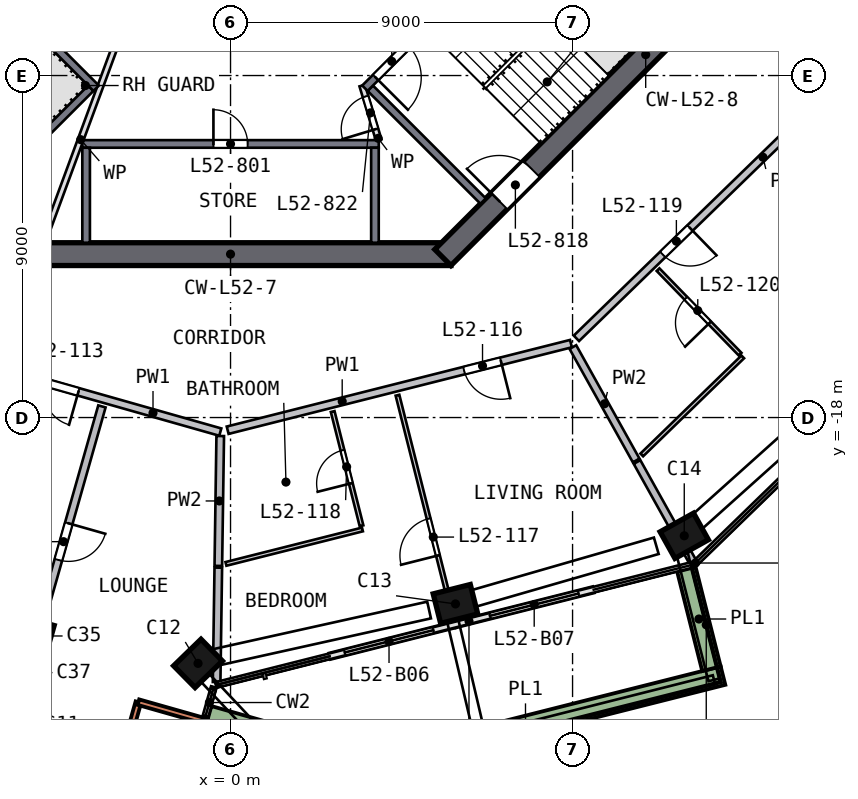
"""IFC4 building model, lengths in metres.
Left out: names, types, materials, properties, quantities, classifications, styles, units other than length and angle.
Written with IfcOpenShell. Run it as: python <this file> out.ifc"""

import sys

from ifc_helpers import new_model, si_unit, direction, frame, frame_2d, origin, origin_2d, place, context, subcontext, project, spatial, rectangle, extrude, element, fill, save


model = new_model("IFC4")
c1 = context("Model", 3, precision=1e-05, world=origin(), true_north=direction((0.0, 1.0)))
c2 = subcontext(c1, "Body", "Model", "MODEL_VIEW")
j1 = project(units=[si_unit("LENGTHUNIT", "METRE"), si_unit("PLANEANGLEUNIT", "RADIAN")], contexts=[c1])
p1 = place(None, origin())
s1 = spatial("IfcSite", under=j1, at=p1, CompositionType="ELEMENT")
p2 = place(p1, origin())
s2 = spatial("IfcBuilding", under=s1, at=p2, CompositionType="ELEMENT")
p3 = place(p2, frame((0.0, 0.0, 212.5)))
s3 = spatial("IfcBuildingStorey", under=s2, at=p3, CompositionType="ELEMENT", Elevation=212.5)
p4 = place(p3, frame((-0.996, -24.465, 0.0), z_axis=(0.116310459, -0.003798882, 0.993205641), x_axis=(-0.71056635, -0.699005782, 0.080538062)))
e1 = element("IfcColumn", 1, at=p4, inside=s3, PredefinedType="COLUMN", context=c2, shape_type="SweptSolid", body=[
    extrude(rectangle(XDim=1.0, YDim=0.8, at=origin_2d()), origin(), (0.0, 0.0, 1.0), 3.021),
])
p5 = place(p3, frame((5.788, -22.939, 0.0), z_axis=(0.108842351, 0.028463973, 0.99365142), x_axis=(0.96342149, 0.243234613, -0.112498691)))
e2 = element("IfcColumn", 2, at=p5, inside=s3, PredefinedType="COLUMN", context=c2, shape_type="SweptSolid", body=[
    extrude(rectangle(XDim=1.0, YDim=0.8, at=origin_2d()), origin(), (0.0, 0.0, 1.0), 3.019),
])
p6 = place(p3, frame((11.818, -21.181, 0.0), z_axis=(0.100237911, 0.057070939, 0.993325359), x_axis=(-0.867359933, -0.484131141, 0.115342033)))
e3 = element("IfcColumn", 3, at=p6, inside=s3, PredefinedType="COLUMN", context=c2, shape_type="SweptSolid", body=[
    extrude(rectangle(XDim=1.0, YDim=0.8, at=origin_2d()), origin(), (0.0, 0.0, 1.0), 3.02),
])
p7 = place(p3, frame((-5.274, -23.719, 0.0), z_axis=(0.112927488, -0.024169878, 0.993309216), x_axis=(-0.272497155, -0.96212682, 0.007568572)))
e4 = element("IfcColumn", 4, at=p7, inside=s3, PredefinedType="COLUMN", context=c2, shape_type="SweptSolid", body=[
    extrude(rectangle(XDim=0.8, YDim=0.8, at=origin_2d()), origin(), (0.0, 0.0, 1.0), 3.02),
])
p8 = place(p3, frame((-5.799, -13.7, 0.0), z_axis=(0.0, 0.0, 1.0), x_axis=(1.0, 0.0, 0.0)))
e5 = element("IfcWall", 5, at=p8, inside=s3, PredefinedType="SHEAR", context=c2, shape_type="SweptSolid", body=[
    extrude(rectangle(XDim=11.598, YDim=0.6, at=frame_2d((5.799, 0.0))), origin(), (0.0, 0.0, 1.0), 3.5),
])
p9 = place(p3, frame((5.587, -13.788, 0.0), z_axis=(0.0, 0.0, 1.0), x_axis=(0.707106781, 0.707106781, 0.0)))
e6 = element("IfcWall", 6, at=p9, inside=s3, PredefinedType="SHEAR", context=c2, shape_type="SweptSolid", body=[
    extrude(rectangle(XDim=11.598, YDim=0.6, at=frame_2d((5.799, 0.0))), origin(), (0.0, 0.0, 1.0), 3.5),
])
p10 = place(p9, frame((2.099, 0.0, 0.0)))
e7 = element("IfcOpeningElement", 7, at=p10, cuts=e6, PredefinedType="OPENING", context=c2, shape_type="SweptSolid", body=[
    extrude(rectangle(XDim=1.2, YDim=2.1, at=frame_2d((0.6, 1.05))), frame((0.0, 0.31, 0.0), z_axis=(0.0, -1.0, 0.0), x_axis=(1.0, 0.0, 0.0)), (0.0, 0.0, 1.0), 0.62),
])
p11 = place(p3, frame((-2.936, -27.293, 0.0), z_axis=(0.0, 0.0, 1.0), x_axis=(0.27293203, 0.962033319, 0.0)))
e8 = element("IfcWall", 8, at=p11, inside=s3, PredefinedType="SOLIDWALL", context=c2, shape_type="SweptSolid", body=[
    extrude(rectangle(XDim=1.875, YDim=0.15, at=frame_2d((0.938, 0.0))), origin(), (0.0, 0.0, 1.0), 3.0),
])
p12 = place(p3, frame((-2.425, -25.49, 0.0), z_axis=(0.0, 0.0, 1.0), x_axis=(0.962043017, -0.272897843, 0.0)))
e9 = element("IfcWall", 9, at=p12, inside=s3, PredefinedType="SOLIDWALL", context=c2, shape_type="SweptSolid", body=[
    extrude(rectangle(XDim=1.875, YDim=0.15, at=frame_2d((0.938, 0.0))), origin(), (0.0, 0.0, 1.0), 3.0),
])
p13 = place(p3, frame((2.619, -24.28, 0.0), z_axis=(0.0, 0.0, 1.0), x_axis=(0.969612207, 0.244647026, 0.0)))
e10 = element("IfcWall", 10, at=p13, inside=s3, PredefinedType="SOLIDWALL", context=c2, shape_type="SweptSolid", body=[
    extrude(rectangle(XDim=3.4, YDim=0.15, at=frame_2d((1.7, 0.0))), origin(), (0.0, 0.0, 1.0), 2.935),
])
p14 = place(p13, frame((0.4, 0.0, 0.0)))
e11 = element("IfcOpeningElement", 11, at=p14, cuts=e10, PredefinedType="OPENING", context=c2, shape_type="SweptSolid", body=[
    extrude(rectangle(XDim=2.4, YDim=2.4, at=frame_2d((1.2, 1.2))), frame((0.0, 0.085, 0.0), z_axis=(0.0, -1.0, 0.0), x_axis=(1.0, 0.0, 0.0)), (0.0, 0.0, 1.0), 0.17),
])
p15 = place(p3, frame((5.916, -23.448, 0.0), z_axis=(0.0, 0.0, 1.0), x_axis=(0.969617968, 0.244624194, 0.0)))
e12 = element("IfcWall", 12, at=p15, inside=s3, PredefinedType="SOLIDWALL", context=c2, shape_type="SweptSolid", body=[
    extrude(rectangle(XDim=3.74, YDim=0.15, at=frame_2d((1.87, 0.0))), origin(), (0.0, 0.0, 1.0), 2.935),
])
p16 = place(p15, frame((0.94, 0.0, 0.0)))
e13 = element("IfcOpeningElement", 13, at=p16, cuts=e12, PredefinedType="OPENING", context=c2, shape_type="SweptSolid", body=[
    extrude(rectangle(XDim=2.4, YDim=2.4, at=frame_2d((1.2, 1.2))), frame((0.0, 0.085, 0.0), z_axis=(0.0, -1.0, 0.0), x_axis=(1.0, 0.0, 0.0)), (0.0, 0.0, 1.0), 0.17),
])
p17 = place(p3, frame((-0.572, -25.833, 0.0), z_axis=(0.0, 0.0, 1.0), x_axis=(0.962049015, -0.272876699, 0.0)))
e14 = element("IfcWall", 14, at=p17, inside=s3, PredefinedType="SOLIDWALL", context=c2, shape_type="SweptSolid", body=[
    extrude(rectangle(XDim=1.731, YDim=0.5, at=frame_2d((0.866, 0.0))), origin(), (0.0, 0.0, 1.0), 0.7),
])
p18 = place(p3, frame((2.565, -27.414, 0.0), z_axis=(0.0, 0.0, 1.0), x_axis=(0.969616404, 0.244630395, 0.0)))
e15 = element("IfcWall", 15, at=p18, inside=s3, PredefinedType="SOLIDWALL", context=c2, shape_type="SweptSolid", body=[
    extrude(rectangle(XDim=10.719, YDim=0.5, at=frame_2d((5.36, 0.0))), origin(), (0.0, 0.0, 1.0), 0.7),
])
p19 = place(p3, frame((12.655, -24.61, 0.0), z_axis=(0.0, 0.0, 1.0), x_axis=(-0.244684701, 0.969602701, 0.0)))
e16 = element("IfcWall", 16, at=p19, inside=s3, PredefinedType="SOLIDWALL", context=c2, shape_type="SweptSolid", body=[
    extrude(rectangle(XDim=2.699, YDim=0.5, at=frame_2d((1.35, 0.0))), origin(), (0.0, 0.0, 1.0), 0.7),
])
p20 = place(p3, frame((-3.9, -10.8, 0.0), z_axis=(0.0, 0.0, 1.0), x_axis=(1.0, 0.0, 0.0)))
e17 = element("IfcWall", 17, at=p20, inside=s3, PredefinedType="SOLIDWALL", context=c2, shape_type="SweptSolid", body=[
    extrude(rectangle(XDim=7.8, YDim=0.2, at=frame_2d((3.9, 0.0))), origin(), (0.0, 0.0, 1.0), 3.0),
])
p21 = place(p20, frame((3.45, 0.0, 0.0)))
e18 = element("IfcOpeningElement", 18, at=p21, cuts=e17, PredefinedType="OPENING", context=c2, shape_type="SweptSolid", body=[
    extrude(rectangle(XDim=0.9, YDim=2.1, at=frame_2d((0.45, 1.05))), frame((0.0, 0.11, 0.0), z_axis=(0.0, -1.0, 0.0), x_axis=(1.0, 0.0, 0.0)), (0.0, 0.0, 1.0), 0.22),
])
for number, where, z_axis, x_axis in (
    (19, (-3.8, -10.9, 0.0), (0.0, 0.0, 1.0), (0.0, -1.0, 0.0)),
    (20, (3.8, -10.9, 0.0), (0.0, 0.0, 1.0), (0.0, -1.0, 0.0)),
):
    element("IfcWall", number, at=place(p3, frame(where, z_axis=z_axis, x_axis=x_axis)), inside=s3, PredefinedType="SOLIDWALL", context=c2, shape_type="SweptSolid", body=[
        extrude(rectangle(XDim=2.5, YDim=0.2, at=frame_2d((1.25, 0.0))), origin(), (0.0, 0.0, 1.0), 3.0),
    ])
p22 = place(p3, frame((-3.535, -9.334, 0.0), z_axis=(0.0, 0.0, 1.0), x_axis=(-0.707120946, 0.707092617, 0.0)))
e21 = element("IfcWall", 21, at=p22, inside=s3, PredefinedType="SOLIDWALL", context=c2, shape_type="SweptSolid", body=[
    extrude(rectangle(XDim=8.618, YDim=0.2, at=frame_2d((4.309, 0.0))), origin(), (0.0, 0.0, 1.0), 3.0),
])
p23 = place(p22, frame((6.6, 0.0, 0.0)))
e22 = element("IfcOpeningElement", 22, at=p23, cuts=e21, PredefinedType="OPENING", context=c2, shape_type="SweptSolid", body=[
    extrude(rectangle(XDim=1.2, YDim=2.1, at=frame_2d((0.6, 1.05))), frame((0.0, 0.11, 0.0), z_axis=(0.0, -1.0, 0.0), x_axis=(1.0, 0.0, 0.0)), (0.0, 0.0, 1.0), 0.22),
])
p24 = place(p3, frame((-3.677, -9.334, 0.0), z_axis=(0.0, 0.0, 1.0), x_axis=(-0.707077716, -0.707135845, 0.0)))
e23 = element("IfcWall", 23, at=p24, inside=s3, PredefinedType="SOLIDWALL", context=c2, shape_type="SweptSolid", body=[
    extrude(rectangle(XDim=4.2, YDim=0.2, at=frame_2d((2.1, 0.0))), origin(), (0.0, 0.0, 1.0), 3.0),
])
p25 = place(p3, frame((9.629, -3.24, 0.0), z_axis=(0.0, 0.0, 1.0), x_axis=(-0.707120946, -0.707092617, 0.0)))
e24 = element("IfcWall", 24, at=p25, inside=s3, PredefinedType="SOLIDWALL", context=c2, shape_type="SweptSolid", body=[
    extrude(rectangle(XDim=8.618, YDim=0.2, at=frame_2d((4.309, 0.0))), origin(), (0.0, 0.0, 1.0), 3.0),
])
p26 = place(p25, frame((7.018, 0.0, 0.0)))
e25 = element("IfcOpeningElement", 25, at=p26, cuts=e24, PredefinedType="OPENING", context=c2, shape_type="SweptSolid", body=[
    extrude(rectangle(XDim=1.2, YDim=2.1, at=frame_2d((0.6, 1.05))), frame((0.0, 0.11, 0.0), z_axis=(0.0, -1.0, 0.0), x_axis=(1.0, 0.0, 0.0)), (0.0, 0.0, 1.0), 0.22),
])
p27 = place(p3, frame((3.677, -9.334, 0.0), z_axis=(0.0, 0.0, 1.0), x_axis=(0.707077716, -0.707135845, 0.0)))
e26 = element("IfcWall", 26, at=p27, inside=s3, PredefinedType="SOLIDWALL", context=c2, shape_type="SweptSolid", body=[
    extrude(rectangle(XDim=4.2, YDim=0.2, at=frame_2d((2.1, 0.0))), origin(), (0.0, 0.0, 1.0), 3.0),
])
p28 = place(p3, frame((3.9, -10.7, 0.0), z_axis=(0.0, 0.0, 1.0), x_axis=(-0.289808785, 0.957084567, 0.0)))
e27 = element("IfcWall", 27, at=p28, inside=s3, PredefinedType="PARTITIONING", context=c2, shape_type="SweptSolid", body=[
    extrude(rectangle(XDim=1.501, YDim=0.15, at=frame_2d((0.75, 0.0))), origin(), (0.0, 0.0, 1.0), 3.0),
])
p29 = place(p28, frame((0.301, 0.0, 0.0)))
e28 = element("IfcOpeningElement", 28, at=p29, cuts=e27, PredefinedType="OPENING", context=c2, shape_type="SweptSolid", body=[
    extrude(rectangle(XDim=0.9, YDim=2.1, at=frame_2d((0.45, 1.05))), frame((0.0, 0.085, 0.0), z_axis=(0.0, -1.0, 0.0), x_axis=(1.0, 0.0, 0.0)), (0.0, 0.0, 1.0), 0.17),
])
p30 = place(p3, frame((-1.776, -4.813, 0.0), z_axis=(0.0, 0.0, 1.0), x_axis=(-0.346112108, -0.938193162, 0.0)))
e29 = element("IfcWall", 29, at=p30, inside=s3, PredefinedType="PARTITIONING", context=c2, shape_type="SweptSolid", body=[
    extrude(rectangle(XDim=9.123, YDim=0.15, at=frame_2d((4.562, 0.0))), origin(), (0.0, 0.0, 1.0), 3.0),
])
p31 = place(p30, frame((1.4, 0.0, 0.0)))
e30 = element("IfcOpeningElement", 30, at=p31, cuts=e29, PredefinedType="OPENING", context=c2, shape_type="SweptSolid", body=[
    extrude(rectangle(XDim=1.8, YDim=2.1, at=frame_2d((0.9, 1.05))), frame((0.0, 0.085, 0.0), z_axis=(0.0, -1.0, 0.0), x_axis=(1.0, 0.0, 0.0)), (0.0, 0.0, 1.0), 0.17),
])
p32 = place(p3, frame((-0.27, -18.383, 0.0), z_axis=(0.0, 0.0, 1.0), x_axis=(-0.96202861, 0.272948627, 0.0)))
e31 = element("IfcWall", 31, at=p32, inside=s3, PredefinedType="SOLIDWALL", context=c2, shape_type="SweptSolid", body=[
    extrude(rectangle(XDim=9.317, YDim=0.2, at=frame_2d((4.658, 0.0))), origin(), (0.0, 0.0, 1.0), 3.0),
])
p33 = place(p32, frame((3.881, 0.0, 0.0)))
e32 = element("IfcOpeningElement", 32, at=p33, cuts=e31, PredefinedType="OPENING", context=c2, shape_type="SweptSolid", body=[
    extrude(rectangle(XDim=1.8, YDim=2.1, at=frame_2d((0.9, 1.05))), frame((0.0, 0.11, 0.0), z_axis=(0.0, -1.0, 0.0), x_axis=(1.0, 0.0, 0.0)), (0.0, 0.0, 1.0), 0.22),
])
p34 = place(p3, frame((8.958, -16.055, 0.0), z_axis=(0.0, 0.0, 1.0), x_axis=(-0.969613039, -0.244643731, 0.0)))
e33 = element("IfcWall", 33, at=p34, inside=s3, PredefinedType="SOLIDWALL", context=c2, shape_type="SweptSolid", body=[
    extrude(rectangle(XDim=9.317, YDim=0.2, at=frame_2d((4.658, 0.0))), origin(), (0.0, 0.0, 1.0), 3.0),
])
p35 = place(p34, frame((1.9, 0.0, 0.0)))
e34 = element("IfcOpeningElement", 34, at=p35, cuts=e33, PredefinedType="OPENING", context=c2, shape_type="SweptSolid", body=[
    extrude(rectangle(XDim=1.0, YDim=2.1, at=frame_2d((0.5, 1.05))), frame((0.0, 0.11, 0.0), z_axis=(0.0, -1.0, 0.0), x_axis=(1.0, 0.0, 0.0)), (0.0, 0.0, 1.0), 0.22),
])
p36 = place(p3, frame((15.785, -9.425, 0.0), z_axis=(0.0, 0.0, 1.0), x_axis=(-0.717395, -0.696666645, 0.0)))
e35 = element("IfcWall", 35, at=p36, inside=s3, PredefinedType="SOLIDWALL", context=c2, shape_type="SweptSolid", body=[
    extrude(rectangle(XDim=9.316, YDim=0.2, at=frame_2d((4.658, 0.0))), origin(), (0.0, 0.0, 1.0), 3.0),
])
p37 = place(p36, frame((5.15, 0.0, 0.0)))
e36 = element("IfcOpeningElement", 36, at=p37, cuts=e35, PredefinedType="OPENING", context=c2, shape_type="SweptSolid", body=[
    extrude(rectangle(XDim=1.0, YDim=2.1, at=frame_2d((0.5, 1.05))), frame((0.0, 0.11, 0.0), z_axis=(0.0, -1.0, 0.0), x_axis=(1.0, 0.0, 0.0)), (0.0, 0.0, 1.0), 0.22),
])
p38 = place(p3, frame((-3.384, -17.707, 0.0), z_axis=(0.0, 0.0, 1.0), x_axis=(-0.272938926, -0.962031363, 0.0)))
e37 = element("IfcWall", 37, at=p38, inside=s3, PredefinedType="SOLIDWALL", context=c2, shape_type="SweptSolid", body=[
    extrude(rectangle(XDim=10.75, YDim=0.2, at=frame_2d((5.375, 0.0))), origin(), (0.0, 0.0, 1.0), 3.0),
])
p39 = place(p38, frame((3.2, 0.0, 0.0)))
e38 = element("IfcOpeningElement", 38, at=p39, cuts=e37, PredefinedType="OPENING", context=c2, shape_type="SweptSolid", body=[
    extrude(rectangle(XDim=1.0, YDim=2.1, at=frame_2d((0.5, 1.05))), frame((0.0, 0.11, 0.0), z_axis=(0.0, -1.0, 0.0), x_axis=(1.0, 0.0, 0.0)), (0.0, 0.0, 1.0), 0.22),
])
p40 = place(p3, frame((-0.322, -21.95, 0.0), z_axis=(0.0, 0.0, 1.0), x_axis=(-0.014673303, -0.999892341, 0.0)))
e39 = element("IfcWall", 39, at=p40, inside=s3, PredefinedType="SOLIDWALL", context=c2, shape_type="SweptSolid", body=[
    extrude(rectangle(XDim=3.011, YDim=0.2, at=frame_2d((1.506, 0.0))), origin(), (0.0, 0.0, 1.0), 3.0),
])
p41 = place(p3, frame((-0.271, -18.486, 0.0), z_axis=(0.0, 0.0, 1.0), x_axis=(-0.014712693, -0.999891762, 0.0)))
e40 = element("IfcWall", 40, at=p41, inside=s3, PredefinedType="SOLIDWALL", context=c2, shape_type="SweptSolid", body=[
    extrude(rectangle(XDim=3.418, YDim=0.2, at=frame_2d((1.709, 0.0))), origin(), (0.0, 0.0, 1.0), 3.0),
])
p42 = place(p3, frame((9.008, -16.145, 0.0), z_axis=(0.0, 0.0, 1.0), x_axis=(0.487261051, -0.873256359, 0.0)))
e41 = element("IfcWall", 41, at=p42, inside=s3, PredefinedType="SOLIDWALL", context=c2, shape_type="SweptSolid", body=[
    extrude(rectangle(XDim=3.419, YDim=0.2, at=frame_2d((1.709, 0.0))), origin(), (0.0, 0.0, 1.0), 3.0),
])
p43 = place(p3, frame((10.696, -19.17, 0.0), z_axis=(0.0, 0.0, 1.0), x_axis=(0.487287097, -0.873241825, 0.0)))
e42 = element("IfcWall", 42, at=p43, inside=s3, PredefinedType="SOLIDWALL", context=c2, shape_type="SweptSolid", body=[
    extrude(rectangle(XDim=3.012, YDim=0.2, at=frame_2d((1.506, 0.0))), origin(), (0.0, 0.0, 1.0), 3.0),
])
p44 = place(p3, frame((-0.12, -21.852, 0.0), z_axis=(0.0, 0.0, 1.0), x_axis=(0.969609013, 0.244659687, 0.0)))
e43 = element("IfcWall", 43, at=p44, inside=s3, PredefinedType="PARTITIONING", context=c2, shape_type="SweptSolid", body=[
    extrude(rectangle(XDim=3.704, YDim=0.1, at=frame_2d((1.852, 0.0))), origin(), (0.0, 0.0, 1.0), 3.0),
])
p45 = place(p3, frame((3.447, -20.849, 0.0), z_axis=(0.0, 0.0, 1.0), x_axis=(-0.244610474, 0.969621429, 0.0)))
e44 = element("IfcWall", 44, at=p45, inside=s3, PredefinedType="PARTITIONING", context=c2, shape_type="SweptSolid", body=[
    extrude(rectangle(XDim=3.1, YDim=0.1, at=frame_2d((1.55, 0.0))), origin(), (0.0, 0.0, 1.0), 3.0),
])
p46 = place(p45, frame((1.15, 0.0, 0.0)))
e45 = element("IfcOpeningElement", 45, at=p46, cuts=e44, PredefinedType="OPENING", context=c2, shape_type="SweptSolid", body=[
    extrude(rectangle(XDim=0.9, YDim=2.1, at=frame_2d((0.45, 1.05))), frame((0.0, 0.06, 0.0), z_axis=(0.0, -1.0, 0.0), x_axis=(1.0, 0.0, 0.0)), (0.0, 0.0, 1.0), 0.12),
])
p47 = place(p3, frame((5.898, -23.376, 0.0), z_axis=(0.0, 0.0, 1.0), x_axis=(-0.244618035, 0.969619522, 0.0)))
e46 = element("IfcWall", 46, at=p47, inside=s3, PredefinedType="PARTITIONING", context=c2, shape_type="SweptSolid", body=[
    extrude(rectangle(XDim=6.15, YDim=0.1, at=frame_2d((3.075, 0.0))), origin(), (0.0, 0.0, 1.0), 3.0),
])
p48 = place(p47, frame((1.8, 0.0, 0.0)))
e47 = element("IfcOpeningElement", 47, at=p48, cuts=e46, PredefinedType="OPENING", context=c2, shape_type="SweptSolid", body=[
    extrude(rectangle(XDim=1.0, YDim=2.1, at=frame_2d((0.5, 1.05))), frame((0.0, 0.06, 0.0), z_axis=(0.0, -1.0, 0.0), x_axis=(1.0, 0.0, 0.0)), (0.0, 0.0, 1.0), 0.12),
])
p49 = place(p3, frame((13.479, -16.404, 0.0), z_axis=(0.0, 0.0, 1.0), x_axis=(-0.71737914, -0.696682976, 0.0)))
e48 = element("IfcWall", 48, at=p49, inside=s3, PredefinedType="PARTITIONING", context=c2, shape_type="SweptSolid", body=[
    extrude(rectangle(XDim=3.704, YDim=0.1, at=frame_2d((1.852, 0.0))), origin(), (0.0, 0.0, 1.0), 3.0),
])
p50 = place(p3, frame((13.409, -16.332, 0.0), z_axis=(0.0, 0.0, 1.0), x_axis=(-0.696635178, 0.717425556, 0.0)))
e49 = element("IfcWall", 49, at=p50, inside=s3, PredefinedType="PARTITIONING", context=c2, shape_type="SweptSolid", body=[
    extrude(rectangle(XDim=3.1, YDim=0.1, at=frame_2d((1.55, 0.0))), origin(), (0.0, 0.0, 1.0), 3.0),
])
p51 = place(p50, frame((1.15, 0.0, 0.0)))
e50 = element("IfcOpeningElement", 50, at=p51, cuts=e49, PredefinedType="OPENING", context=c2, shape_type="SweptSolid", body=[
    extrude(rectangle(XDim=0.9, YDim=2.1, at=frame_2d((0.45, 1.05))), frame((0.0, 0.06, 0.0), z_axis=(0.0, -1.0, 0.0), x_axis=(1.0, 0.0, 0.0)), (0.0, 0.0, 1.0), 0.12),
])
p52 = place(p14, origin())
e51 = element("IfcDoor", 51, at=p52, inside=s3, OperationType="SLIDING_TO_RIGHT", PredefinedType="DOOR", context=c2, shape_type="SweptSolid", body=[
    extrude(rectangle(XDim=2.4, YDim=2.4, at=frame_2d((1.2, 1.2))), frame((0.0, 0.025, 0.0), z_axis=(0.0, -1.0, 0.0), x_axis=(1.0, 0.0, 0.0)), (0.0, 0.0, 1.0), 0.05),
])
fill(e11, e51)
p53 = place(p16, origin())
e52 = element("IfcDoor", 52, at=p53, inside=s3, OperationType="SLIDING_TO_LEFT", PredefinedType="DOOR", context=c2, shape_type="SweptSolid", body=[
    extrude(rectangle(XDim=2.4, YDim=2.4, at=frame_2d((1.2, 1.2))), frame((0.0, 0.025, 0.0), z_axis=(0.0, -1.0, 0.0), x_axis=(1.0, 0.0, 0.0)), (0.0, 0.0, 1.0), 0.05),
])
fill(e13, e52)
p54 = place(p21, origin())
e53 = element("IfcDoor", 53, at=p54, inside=s3, OperationType="SINGLE_SWING_LEFT", PredefinedType="DOOR", context=c2, shape_type="SweptSolid", body=[
    extrude(rectangle(XDim=0.9, YDim=2.1, at=frame_2d((0.45, 1.05))), frame((0.0, 0.025, 0.0), z_axis=(0.0, -1.0, 0.0), x_axis=(1.0, 0.0, 0.0)), (0.0, 0.0, 1.0), 0.05),
])
fill(e18, e53)
p55 = place(p26, origin())
e54 = element("IfcDoor", 54, at=p55, inside=s3, OperationType="SINGLE_SWING_RIGHT", PredefinedType="DOOR", context=c2, shape_type="SweptSolid", body=[
    extrude(rectangle(XDim=1.2, YDim=2.1, at=frame_2d((0.6, 1.05))), frame((0.0, 0.025, 0.0), z_axis=(0.0, -1.0, 0.0), x_axis=(1.0, 0.0, 0.0)), (0.0, 0.0, 1.0), 0.05),
])
fill(e25, e54)
p56 = place(p10, origin())
e55 = element("IfcDoor", 55, at=p56, inside=s3, OperationType="SINGLE_SWING_LEFT", PredefinedType="DOOR", context=c2, shape_type="SweptSolid", body=[
    extrude(rectangle(XDim=1.2, YDim=2.1, at=frame_2d((0.6, 1.05))), frame((0.0, 0.025, 0.0), z_axis=(0.0, -1.0, 0.0), x_axis=(1.0, 0.0, 0.0)), (0.0, 0.0, 1.0), 0.05),
])
fill(e7, e55)
p57 = place(p29, origin())
e56 = element("IfcDoor", 56, at=p57, inside=s3, OperationType="SINGLE_SWING_LEFT", PredefinedType="DOOR", context=c2, shape_type="SweptSolid", body=[
    extrude(rectangle(XDim=0.9, YDim=2.1, at=frame_2d((0.45, 1.05))), frame((0.0, 0.025, 0.0), z_axis=(0.0, -1.0, 0.0), x_axis=(1.0, 0.0, 0.0)), (0.0, 0.0, 1.0), 0.05),
])
fill(e28, e56)
p58 = place(p33, origin())
e57 = element("IfcDoor", 57, at=p58, inside=s3, OperationType="DOUBLE_DOOR_SINGLE_SWING", PredefinedType="DOOR", context=c2, shape_type="SweptSolid", body=[
    extrude(rectangle(XDim=1.8, YDim=2.1, at=frame_2d((0.9, 1.05))), frame((0.0, 0.025, 0.0), z_axis=(0.0, -1.0, 0.0), x_axis=(1.0, 0.0, 0.0)), (0.0, 0.0, 1.0), 0.05),
])
fill(e32, e57)
p59 = place(p39, origin())
e58 = element("IfcDoor", 58, at=p59, inside=s3, OperationType="SINGLE_SWING_LEFT", PredefinedType="DOOR", context=c2, shape_type="SweptSolid", body=[
    extrude(rectangle(XDim=1.0, YDim=2.1, at=frame_2d((0.5, 1.05))), frame((0.0, 0.025, 0.0), z_axis=(0.0, -1.0, 0.0), x_axis=(1.0, 0.0, 0.0)), (0.0, 0.0, 1.0), 0.05),
])
fill(e38, e58)
p60 = place(p35, origin())
e59 = element("IfcDoor", 59, at=p60, inside=s3, OperationType="SINGLE_SWING_LEFT", PredefinedType="DOOR", context=c2, shape_type="SweptSolid", body=[
    extrude(rectangle(XDim=1.0, YDim=2.1, at=frame_2d((0.5, 1.05))), frame((0.0, 0.025, 0.0), z_axis=(0.0, -1.0, 0.0), x_axis=(1.0, 0.0, 0.0)), (0.0, 0.0, 1.0), 0.05),
])
fill(e34, e59)
p61 = place(p48, origin())
e60 = element("IfcDoor", 60, at=p61, inside=s3, OperationType="SINGLE_SWING_LEFT", PredefinedType="DOOR", context=c2, shape_type="SweptSolid", body=[
    extrude(rectangle(XDim=1.0, YDim=2.1, at=frame_2d((0.5, 1.05))), frame((0.0, 0.025, 0.0), z_axis=(0.0, -1.0, 0.0), x_axis=(1.0, 0.0, 0.0)), (0.0, 0.0, 1.0), 0.05),
])
fill(e47, e60)
p62 = place(p46, origin())
e61 = element("IfcDoor", 61, at=p62, inside=s3, OperationType="SINGLE_SWING_LEFT", PredefinedType="DOOR", context=c2, shape_type="SweptSolid", body=[
    extrude(rectangle(XDim=0.9, YDim=2.1, at=frame_2d((0.45, 1.05))), frame((0.0, 0.025, 0.0), z_axis=(0.0, -1.0, 0.0), x_axis=(1.0, 0.0, 0.0)), (0.0, 0.0, 1.0), 0.05),
])
fill(e45, e61)
p63 = place(p37, origin())
e62 = element("IfcDoor", 62, at=p63, inside=s3, OperationType="SINGLE_SWING_LEFT", PredefinedType="DOOR", context=c2, shape_type="SweptSolid", body=[
    extrude(rectangle(XDim=1.0, YDim=2.1, at=frame_2d((0.5, 1.05))), frame((0.0, 0.025, 0.0), z_axis=(0.0, -1.0, 0.0), x_axis=(1.0, 0.0, 0.0)), (0.0, 0.0, 1.0), 0.05),
])
fill(e36, e62)
p64 = place(p51, origin())
e63 = element("IfcDoor", 63, at=p64, inside=s3, OperationType="SINGLE_SWING_LEFT", PredefinedType="DOOR", context=c2, shape_type="SweptSolid", body=[
    extrude(rectangle(XDim=0.9, YDim=2.1, at=frame_2d((0.45, 1.05))), frame((0.0, 0.025, 0.0), z_axis=(0.0, -1.0, 0.0), x_axis=(1.0, 0.0, 0.0)), (0.0, 0.0, 1.0), 0.05),
])
fill(e50, e63)
save(model, sys.argv[1])
